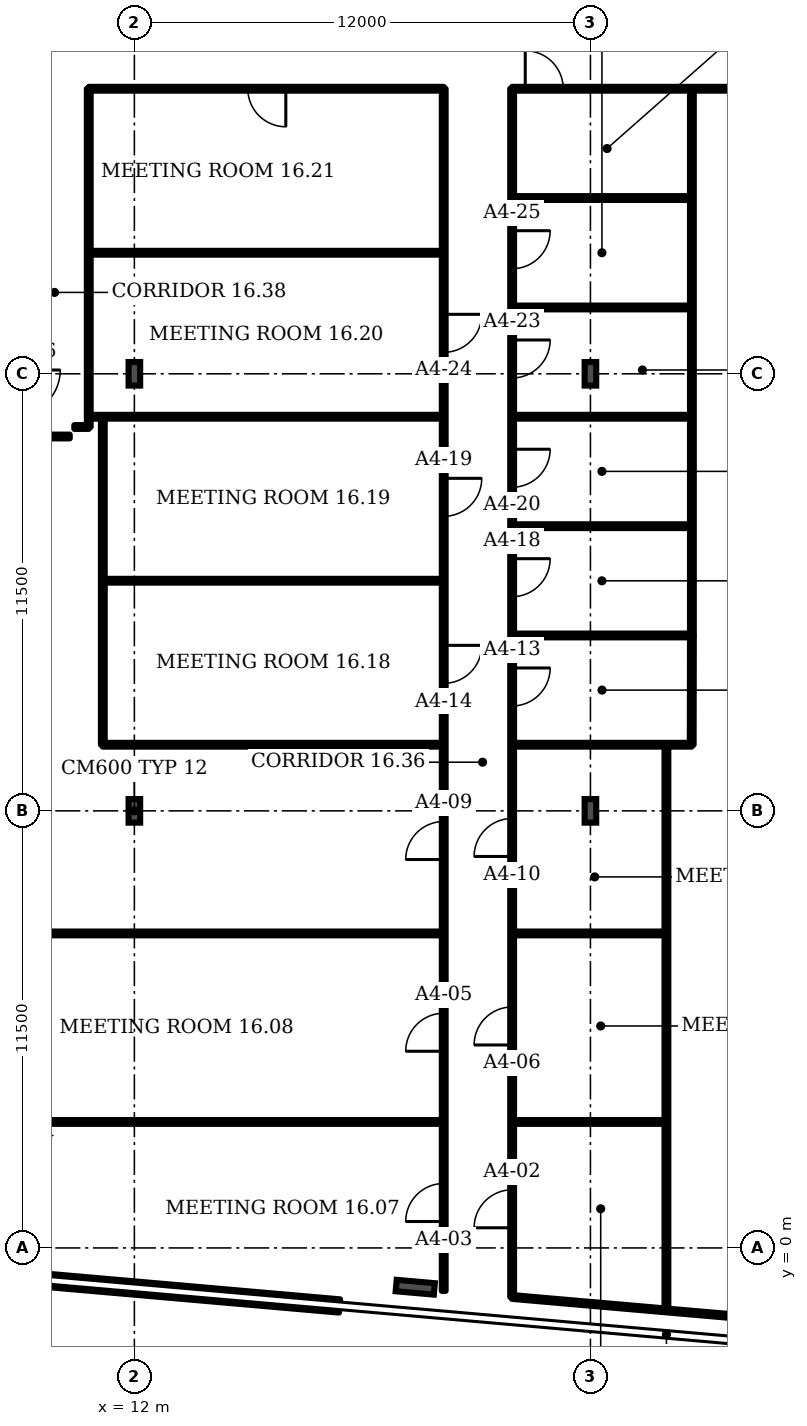
"""IFC4 building model, lengths in metres.
Left out: names, types, materials, properties, quantities, classifications, styles, units other than length and angle.
Written with IfcOpenShell. Run it as: python <this file> out.ifc"""

import sys

from ifc_helpers import new_model, si_unit, direction, frame, frame_2d, origin, origin_2d, place, context, subcontext, project, spatial, rectangle, i_section, extrude, element, fill, save


model = new_model("IFC4")
c1 = context("Model", 3, precision=1e-05, world=origin(), true_north=direction((0.0, 1.0)))
c2 = subcontext(c1, "Body", "Model", "MODEL_VIEW")
j1 = project(units=[si_unit("LENGTHUNIT", "METRE"), si_unit("PLANEANGLEUNIT", "RADIAN")], contexts=[c1])
p1 = place(None, origin())
s1 = spatial("IfcSite", under=j1, at=p1, CompositionType="ELEMENT")
p2 = place(p1, origin())
s2 = spatial("IfcBuilding", under=s1, at=p2, CompositionType="ELEMENT")
p3 = place(p2, frame((0.0, 0.0, 77.5)))
s3 = spatial("IfcBuildingStorey", under=s2, at=p3, CompositionType="ELEMENT", Elevation=77.5)
p4 = place(p3, frame((19.391, -1.034, 0.0), z_axis=(0.0, 0.0, 1.0), x_axis=(-0.087156, -0.996198, 0.0)))
e1 = element("IfcColumn", 1, at=p4, inside=s3, PredefinedType="COLUMN", context=c2, shape_type="SweptSolid", body=[
    extrude(i_section(OverallWidth=0.302, OverallDepth=1.008, WebThickness=0.021, FlangeThickness=0.04, FilletRadius=0.03, at=origin_2d()), origin(), (0.0, 0.0, 1.0), 3.6),
])
for number, where, z_axis, x_axis in (
    (2, (12.0, 11.5, 0.0), (0.0, 0.0, 1.0), (1.0, 0.0, 0.0)),
    (3, (24.0, 11.5, 0.0), (0.0, 0.0, 1.0), (1.0, 0.0, 0.0)),
    (4, (12.0, 23.0, 0.0), (0.0, 0.0, 1.0), (1.0, 0.0, 0.0)),
    (5, (24.0, 23.0, 0.0), (0.0, 0.0, 1.0), (1.0, 0.0, 0.0)),
):
    element("IfcColumn", number, at=place(p3, frame(where, z_axis=z_axis, x_axis=x_axis)), inside=s3, PredefinedType="COLUMN", context=c2, shape_type="SweptSolid", body=[
        extrude(i_section(OverallWidth=0.305, OverallDepth=0.62, WebThickness=0.021, FlangeThickness=0.04, FilletRadius=0.027, at=origin_2d()), origin(), (0.0, 0.0, 1.0), 3.6),
    ])
p5 = place(p3, frame((5.835, -0.516, 0.0), z_axis=(0.0, 0.0, 1.0), x_axis=(0.996192, -0.087142, 0.0)))
e6 = element("IfcWall", 6, at=p5, inside=s3, PredefinedType="SOLIDWALL", context=c2, shape_type="SweptSolid", body=[
    extrude(rectangle(XDim=11.607, YDim=0.35, at=frame_2d((5.804, 0.0))), origin(), (0.0, 0.0, 1.0), 1.0),
])
p6 = place(p3, frame((6.0, 8.275, 0.0), z_axis=(0.0, 0.0, 1.0), x_axis=(1.0, 0.0, 0.0)))
e7 = element("IfcWall", 7, at=p6, inside=s3, PredefinedType="PARTITIONING", context=c2, shape_type="SweptSolid", body=[
    extrude(rectangle(XDim=14.14, YDim=0.1, at=frame_2d((7.07, 0.0))), origin(), (0.0, 0.0, 1.0), 3.2),
])
p7 = place(p3, frame((6.02, 3.315, 0.0), z_axis=(0.0, 0.0, 1.0), x_axis=(1.0, 0.0, 0.0)))
e8 = element("IfcWall", 8, at=p7, inside=s3, PredefinedType="PARTITIONING", context=c2, shape_type="SweptSolid", body=[
    extrude(rectangle(XDim=14.12, YDim=0.1, at=frame_2d((7.06, 0.0))), origin(), (0.0, 0.0, 1.0), 3.2),
])
p8 = place(p3, frame((9.02, 21.35, 0.0), z_axis=(0.0, 0.0, 1.0), x_axis=(1.0, 0.0, 0.0)))
e9 = element("IfcWall", 9, at=p8, inside=s3, PredefinedType="PARTITIONING", context=c2, shape_type="SweptSolid", body=[
    extrude(rectangle(XDim=1.28, YDim=0.1, at=frame_2d((0.64, 0.0))), origin(), (0.0, 0.0, 1.0), 3.2),
])
p9 = place(p3, frame((10.42, 21.6, 0.0), z_axis=(0.0, 0.0, 1.0), x_axis=(1.0, 0.0, 0.0)))
e10 = element("IfcWall", 10, at=p9, inside=s3, PredefinedType="PARTITIONING", context=c2, shape_type="SweptSolid", body=[
    extrude(rectangle(XDim=0.38, YDim=0.1, at=frame_2d((0.19, 0.0))), origin(), (0.0, 0.0, 1.0), 3.2),
])
p10 = place(p3, frame((10.8, 21.6, 0.0), z_axis=(0.0, 0.0, 1.0), x_axis=(0.0, 1.0, 0.0)))
e11 = element("IfcWall", 11, at=p10, inside=s3, PredefinedType="PARTITIONING", context=c2, shape_type="SweptSolid", body=[
    extrude(rectangle(XDim=8.9, YDim=0.1, at=frame_2d((4.45, 0.0))), origin(), (0.0, 0.0, 1.0), 3.2),
])
for number, where, z_axis, x_axis in (
    (12, (10.8, 21.87, 0.0), (0.0, 0.0, 1.0), (1.0, 0.0, 0.0)),
    (13, (10.8, 26.185, 0.0), (0.0, 0.0, 1.0), (1.0, 0.0, 0.0)),
):
    element("IfcWall", number, at=place(p3, frame(where, z_axis=z_axis, x_axis=x_axis)), inside=s3, PredefinedType="PARTITIONING", context=c2, shape_type="SweptSolid", body=[
        extrude(rectangle(XDim=9.34, YDim=0.1, at=frame_2d((4.67, 0.0))), origin(), (0.0, 0.0, 1.0), 3.2),
    ])
p11 = place(p3, frame((10.8, 30.5, 0.0), z_axis=(0.0, 0.0, 1.0), x_axis=(1.0, 0.0, 0.0)))
e14 = element("IfcWall", 14, at=p11, inside=s3, PredefinedType="PARTITIONING", context=c2, shape_type="SweptSolid", body=[
    extrude(rectangle(XDim=9.34, YDim=0.1, at=frame_2d((4.67, 0.0))), origin(), (0.0, 0.0, 1.0), 3.2),
])
p12 = place(p11, frame((4.185, 0.0, 0.0)))
e15 = element("IfcOpeningElement", 15, at=p12, cuts=e14, PredefinedType="OPENING", context=c2, shape_type="SweptSolid", body=[
    extrude(rectangle(XDim=1.0, YDim=2.1, at=frame_2d((0.5, 1.05))), frame((0.0, 0.06, 0.0), z_axis=(0.0, -1.0, 0.0), x_axis=(1.0, 0.0, 0.0)), (0.0, 0.0, 1.0), 0.12),
])
p13 = place(p3, frame((11.17, 13.24, 0.0), z_axis=(0.0, 0.0, 1.0), x_axis=(0.0, 1.0, 0.0)))
e16 = element("IfcWall", 16, at=p13, inside=s3, PredefinedType="PARTITIONING", context=c2, shape_type="SweptSolid", body=[
    extrude(rectangle(XDim=8.63, YDim=0.1, at=frame_2d((4.315, 0.0))), origin(), (0.0, 0.0, 1.0), 3.2),
])
for number, where, z_axis, x_axis in (
    (17, (11.17, 13.24, 0.0), (0.0, 0.0, 1.0), (1.0, 0.0, 0.0)),
    (18, (11.17, 17.555, 0.0), (0.0, 0.0, 1.0), (1.0, 0.0, 0.0)),
):
    element("IfcWall", number, at=place(p3, frame(where, z_axis=z_axis, x_axis=x_axis)), inside=s3, PredefinedType="PARTITIONING", context=c2, shape_type="SweptSolid", body=[
        extrude(rectangle(XDim=8.97, YDim=0.1, at=frame_2d((4.485, 0.0))), origin(), (0.0, 0.0, 1.0), 3.2),
    ])
p14 = place(p3, frame((20.14, -1.13, 0.0), z_axis=(0.0, 0.0, 1.0), x_axis=(0.0, 1.0, 0.0)))
e19 = element("IfcWall", 19, at=p14, inside=s3, PredefinedType="PARTITIONING", context=c2, shape_type="SweptSolid", body=[
    extrude(rectangle(XDim=31.63, YDim=0.1, at=frame_2d((15.815, 0.0))), origin(), (0.0, 0.0, 1.0), 3.2),
])
p15 = place(p14, frame((1.825, 0.0, 0.0)))
e20 = element("IfcOpeningElement", 20, at=p15, cuts=e19, PredefinedType="OPENING", context=c2, shape_type="SweptSolid", body=[
    extrude(rectangle(XDim=1.0, YDim=2.1, at=frame_2d((0.5, 1.05))), frame((0.0, 0.06, 0.0), z_axis=(0.0, -1.0, 0.0), x_axis=(1.0, 0.0, 0.0)), (0.0, 0.0, 1.0), 0.12),
])
p16 = place(p14, frame((6.305, 0.0, 0.0)))
e21 = element("IfcOpeningElement", 21, at=p16, cuts=e19, PredefinedType="OPENING", context=c2, shape_type="SweptSolid", body=[
    extrude(rectangle(XDim=1.0, YDim=2.1, at=frame_2d((0.5, 1.05))), frame((0.0, 0.06, 0.0), z_axis=(0.0, -1.0, 0.0), x_axis=(1.0, 0.0, 0.0)), (0.0, 0.0, 1.0), 0.12),
])
p17 = place(p14, frame((11.35, 0.0, 0.0)))
e22 = element("IfcOpeningElement", 22, at=p17, cuts=e19, PredefinedType="OPENING", context=c2, shape_type="SweptSolid", body=[
    extrude(rectangle(XDim=1.0, YDim=2.1, at=frame_2d((0.5, 1.05))), frame((0.0, 0.06, 0.0), z_axis=(0.0, -1.0, 0.0), x_axis=(1.0, 0.0, 0.0)), (0.0, 0.0, 1.0), 0.12),
])
p18 = place(p14, frame((15.985, 0.0, 0.0)))
e23 = element("IfcOpeningElement", 23, at=p18, cuts=e19, PredefinedType="OPENING", context=c2, shape_type="SweptSolid", body=[
    extrude(rectangle(XDim=1.0, YDim=2.1, at=frame_2d((0.5, 1.05))), frame((0.0, 0.06, 0.0), z_axis=(0.0, -1.0, 0.0), x_axis=(1.0, 0.0, 0.0)), (0.0, 0.0, 1.0), 0.12),
])
p19 = place(p14, frame((20.38, 0.0, 0.0)))
e24 = element("IfcOpeningElement", 24, at=p19, cuts=e19, PredefinedType="OPENING", context=c2, shape_type="SweptSolid", body=[
    extrude(rectangle(XDim=1.0, YDim=2.1, at=frame_2d((0.5, 1.05))), frame((0.0, 0.06, 0.0), z_axis=(0.0, -1.0, 0.0), x_axis=(1.0, 0.0, 0.0)), (0.0, 0.0, 1.0), 0.12),
])
p20 = place(p14, frame((24.695, 0.0, 0.0)))
e25 = element("IfcOpeningElement", 25, at=p20, cuts=e19, PredefinedType="OPENING", context=c2, shape_type="SweptSolid", body=[
    extrude(rectangle(XDim=1.0, YDim=2.1, at=frame_2d((0.5, 1.05))), frame((0.0, 0.06, 0.0), z_axis=(0.0, -1.0, 0.0), x_axis=(1.0, 0.0, 0.0)), (0.0, 0.0, 1.0), 0.12),
])
p21 = place(p3, frame((21.94, -1.29, 0.0), z_axis=(0.0, 0.0, 1.0), x_axis=(0.0, 1.0, 0.0)))
e26 = element("IfcWall", 26, at=p21, inside=s3, PredefinedType="PARTITIONING", context=c2, shape_type="SweptSolid", body=[
    extrude(rectangle(XDim=31.79, YDim=0.1, at=frame_2d((15.895, 0.0))), origin(), (0.0, 0.0, 1.0), 3.2),
])
p22 = place(p21, frame((1.82, 0.0, 0.0)))
e27 = element("IfcOpeningElement", 27, at=p22, cuts=e26, PredefinedType="OPENING", context=c2, shape_type="SweptSolid", body=[
    extrude(rectangle(XDim=1.0, YDim=2.1, at=frame_2d((0.5, 1.05))), frame((0.0, 0.06, 0.0), z_axis=(0.0, -1.0, 0.0), x_axis=(1.0, 0.0, 0.0)), (0.0, 0.0, 1.0), 0.12),
])
p23 = place(p21, frame((6.63, 0.0, 0.0)))
e28 = element("IfcOpeningElement", 28, at=p23, cuts=e26, PredefinedType="OPENING", context=c2, shape_type="SweptSolid", body=[
    extrude(rectangle(XDim=1.0, YDim=2.1, at=frame_2d((0.5, 1.05))), frame((0.0, 0.06, 0.0), z_axis=(0.0, -1.0, 0.0), x_axis=(1.0, 0.0, 0.0)), (0.0, 0.0, 1.0), 0.12),
])
p24 = place(p21, frame((11.59, 0.0, 0.0)))
e29 = element("IfcOpeningElement", 29, at=p24, cuts=e26, PredefinedType="OPENING", context=c2, shape_type="SweptSolid", body=[
    extrude(rectangle(XDim=1.0, YDim=2.1, at=frame_2d((0.5, 1.05))), frame((0.0, 0.06, 0.0), z_axis=(0.0, -1.0, 0.0), x_axis=(1.0, 0.0, 0.0)), (0.0, 0.0, 1.0), 0.12),
])
p25 = place(p21, frame((15.55, 0.0, 0.0)))
e30 = element("IfcOpeningElement", 30, at=p25, cuts=e26, PredefinedType="OPENING", context=c2, shape_type="SweptSolid", body=[
    extrude(rectangle(XDim=1.0, YDim=2.1, at=frame_2d((0.5, 1.05))), frame((0.0, 0.06, 0.0), z_axis=(0.0, -1.0, 0.0), x_axis=(1.0, 0.0, 0.0)), (0.0, 0.0, 1.0), 0.12),
])
p26 = place(p21, frame((18.425, 0.0, 0.0)))
e31 = element("IfcOpeningElement", 31, at=p26, cuts=e26, PredefinedType="OPENING", context=c2, shape_type="SweptSolid", body=[
    extrude(rectangle(XDim=1.0, YDim=2.1, at=frame_2d((0.5, 1.05))), frame((0.0, 0.06, 0.0), z_axis=(0.0, -1.0, 0.0), x_axis=(1.0, 0.0, 0.0)), (0.0, 0.0, 1.0), 0.12),
])
p27 = place(p21, frame((21.305, 0.0, 0.0)))
e32 = element("IfcOpeningElement", 32, at=p27, cuts=e26, PredefinedType="OPENING", context=c2, shape_type="SweptSolid", body=[
    extrude(rectangle(XDim=1.0, YDim=2.1, at=frame_2d((0.5, 1.05))), frame((0.0, 0.06, 0.0), z_axis=(0.0, -1.0, 0.0), x_axis=(1.0, 0.0, 0.0)), (0.0, 0.0, 1.0), 0.12),
])
p28 = place(p21, frame((24.18, 0.0, 0.0)))
e33 = element("IfcOpeningElement", 33, at=p28, cuts=e26, PredefinedType="OPENING", context=c2, shape_type="SweptSolid", body=[
    extrude(rectangle(XDim=1.0, YDim=2.1, at=frame_2d((0.5, 1.05))), frame((0.0, 0.06, 0.0), z_axis=(0.0, -1.0, 0.0), x_axis=(1.0, 0.0, 0.0)), (0.0, 0.0, 1.0), 0.12),
])
p29 = place(p21, frame((27.055, 0.0, 0.0)))
e34 = element("IfcOpeningElement", 34, at=p29, cuts=e26, PredefinedType="OPENING", context=c2, shape_type="SweptSolid", body=[
    extrude(rectangle(XDim=1.0, YDim=2.1, at=frame_2d((0.5, 1.05))), frame((0.0, 0.06, 0.0), z_axis=(0.0, -1.0, 0.0), x_axis=(1.0, 0.0, 0.0)), (0.0, 0.0, 1.0), 0.12),
])
for number, where, z_axis, x_axis in (
    (35, (21.94, 3.315, 0.0), (0.0, 0.0, 1.0), (1.0, 0.0, 0.0)),
    (36, (21.94, 8.275, 0.0), (0.0, 0.0, 1.0), (1.0, 0.0, 0.0)),
):
    element("IfcWall", number, at=place(p3, frame(where, z_axis=z_axis, x_axis=x_axis)), inside=s3, PredefinedType="PARTITIONING", context=c2, shape_type="SweptSolid", body=[
        extrude(rectangle(XDim=4.06, YDim=0.1, at=frame_2d((2.03, 0.0))), origin(), (0.0, 0.0, 1.0), 3.2),
    ])
for number, where, z_axis, x_axis in (
    (37, (21.94, 13.24, 0.0), (0.0, 0.0, 1.0), (1.0, 0.0, 0.0)),
    (38, (21.94, 16.115, 0.0), (0.0, 0.0, 1.0), (1.0, 0.0, 0.0)),
    (39, (21.94, 18.99, 0.0), (0.0, 0.0, 1.0), (1.0, 0.0, 0.0)),
    (40, (21.94, 21.87, 0.0), (0.0, 0.0, 1.0), (1.0, 0.0, 0.0)),
    (41, (21.94, 24.745, 0.0), (0.0, 0.0, 1.0), (1.0, 0.0, 0.0)),
    (42, (21.94, 27.625, 0.0), (0.0, 0.0, 1.0), (1.0, 0.0, 0.0)),
):
    element("IfcWall", number, at=place(p3, frame(where, z_axis=z_axis, x_axis=x_axis)), inside=s3, PredefinedType="PARTITIONING", context=c2, shape_type="SweptSolid", body=[
        extrude(rectangle(XDim=4.725, YDim=0.1, at=frame_2d((2.363, 0.0))), origin(), (0.0, 0.0, 1.0), 3.2),
    ])
p30 = place(p3, frame((21.94, 30.5, 0.0), z_axis=(0.0, 0.0, 1.0), x_axis=(1.0, 0.0, 0.0)))
e43 = element("IfcWall", 43, at=p30, inside=s3, PredefinedType="PARTITIONING", context=c2, shape_type="SweptSolid", body=[
    extrude(rectangle(XDim=14.91, YDim=0.1, at=frame_2d((7.455, 0.0))), origin(), (0.0, 0.0, 1.0), 3.2),
])
p31 = place(p30, frame((0.345, 0.0, 0.0)))
e44 = element("IfcOpeningElement", 44, at=p31, cuts=e43, PredefinedType="OPENING", context=c2, shape_type="SweptSolid", body=[
    extrude(rectangle(XDim=1.0, YDim=2.1, at=frame_2d((0.5, 1.05))), frame((0.0, 0.06, 0.0), z_axis=(0.0, -1.0, 0.0), x_axis=(1.0, 0.0, 0.0)), (0.0, 0.0, 1.0), 0.12),
])
p32 = place(p30, frame((8.95, 0.0, 0.0)))
e45 = element("IfcOpeningElement", 45, at=p32, cuts=e43, PredefinedType="OPENING", context=c2, shape_type="SweptSolid", body=[
    extrude(rectangle(XDim=1.8, YDim=2.1, at=frame_2d((0.9, 1.05))), frame((0.0, 0.06, 0.0), z_axis=(0.0, -1.0, 0.0), x_axis=(1.0, 0.0, 0.0)), (0.0, 0.0, 1.0), 0.12),
])
p33 = place(p3, frame((26.0, -1.645, 0.0), z_axis=(0.0, 0.0, 1.0), x_axis=(0.0, 1.0, 0.0)))
e46 = element("IfcWall", 46, at=p33, inside=s3, PredefinedType="PARTITIONING", context=c2, shape_type="SweptSolid", body=[
    extrude(rectangle(XDim=14.885, YDim=0.1, at=frame_2d((7.442, 0.0))), origin(), (0.0, 0.0, 1.0), 3.2),
])
p34 = place(p3, frame((26.665, 13.24, 0.0), z_axis=(0.0, 0.0, 1.0), x_axis=(0.001698, 0.999995, 0.0)))
e47 = element("IfcWall", 47, at=p34, inside=s3, PredefinedType="PARTITIONING", context=c2, shape_type="SweptSolid", body=[
    extrude(rectangle(XDim=2.875, YDim=0.1, at=frame_2d((1.438, 0.0))), origin(), (0.0, 0.0, 1.0), 3.2),
])
p35 = place(p3, frame((26.67, 16.115, 0.0), z_axis=(0.0, 0.0, 1.0), x_axis=(0.0, 1.0, 0.0)))
e48 = element("IfcWall", 48, at=p35, inside=s3, PredefinedType="PARTITIONING", context=c2, shape_type="SweptSolid", body=[
    extrude(rectangle(XDim=14.385, YDim=0.1, at=frame_2d((7.192, 0.0))), origin(), (0.0, 0.0, 1.0), 3.2),
])
p36 = place(p3, frame((33.22, -2.275, 0.0), z_axis=(0.0, 0.0, 1.0), x_axis=(-0.996212, 0.086913, 0.0)))
e49 = element("IfcWall", 49, at=p36, inside=s3, PredefinedType="PARTITIONING", context=c2, shape_type="SweptSolid", body=[
    extrude(rectangle(XDim=11.323, YDim=0.1, at=frame_2d((5.662, 0.0))), origin(), (0.0, 0.0, 1.0), 2.58),
])
p37 = place(p22, origin())
e50 = element("IfcDoor", 50, at=p37, inside=s3, OperationType="SINGLE_SWING_LEFT", PredefinedType="DOOR", context=c2, shape_type="SweptSolid", body=[
    extrude(rectangle(XDim=1.0, YDim=2.1, at=frame_2d((0.5, 1.05))), frame((0.0, 0.025, 0.0), z_axis=(0.0, -1.0, 0.0), x_axis=(1.0, 0.0, 0.0)), (0.0, 0.0, 1.0), 0.05),
])
fill(e27, e50)
p38 = place(p15, origin())
e51 = element("IfcDoor", 51, at=p38, inside=s3, OperationType="SINGLE_SWING_LEFT", PredefinedType="DOOR", context=c2, shape_type="SweptSolid", body=[
    extrude(rectangle(XDim=1.0, YDim=2.1, at=frame_2d((0.5, 1.05))), frame((0.0, 0.025, 0.0), z_axis=(0.0, -1.0, 0.0), x_axis=(1.0, 0.0, 0.0)), (0.0, 0.0, 1.0), 0.05),
])
fill(e20, e51)
p39 = place(p16, origin())
e52 = element("IfcDoor", 52, at=p39, inside=s3, OperationType="SINGLE_SWING_LEFT", PredefinedType="DOOR", context=c2, shape_type="SweptSolid", body=[
    extrude(rectangle(XDim=1.0, YDim=2.1, at=frame_2d((0.5, 1.05))), frame((0.0, 0.025, 0.0), z_axis=(0.0, -1.0, 0.0), x_axis=(1.0, 0.0, 0.0)), (0.0, 0.0, 1.0), 0.05),
])
fill(e21, e52)
p40 = place(p23, origin())
e53 = element("IfcDoor", 53, at=p40, inside=s3, OperationType="SINGLE_SWING_LEFT", PredefinedType="DOOR", context=c2, shape_type="SweptSolid", body=[
    extrude(rectangle(XDim=1.0, YDim=2.1, at=frame_2d((0.5, 1.05))), frame((0.0, 0.025, 0.0), z_axis=(0.0, -1.0, 0.0), x_axis=(1.0, 0.0, 0.0)), (0.0, 0.0, 1.0), 0.05),
])
fill(e28, e53)
p41 = place(p17, origin())
e54 = element("IfcDoor", 54, at=p41, inside=s3, OperationType="SINGLE_SWING_LEFT", PredefinedType="DOOR", context=c2, shape_type="SweptSolid", body=[
    extrude(rectangle(XDim=1.0, YDim=2.1, at=frame_2d((0.5, 1.05))), frame((0.0, 0.025, 0.0), z_axis=(0.0, -1.0, 0.0), x_axis=(1.0, 0.0, 0.0)), (0.0, 0.0, 1.0), 0.05),
])
fill(e22, e54)
p42 = place(p24, origin())
e55 = element("IfcDoor", 55, at=p42, inside=s3, OperationType="SINGLE_SWING_LEFT", PredefinedType="DOOR", context=c2, shape_type="SweptSolid", body=[
    extrude(rectangle(XDim=1.0, YDim=2.1, at=frame_2d((0.5, 1.05))), frame((0.0, 0.025, 0.0), z_axis=(0.0, -1.0, 0.0), x_axis=(1.0, 0.0, 0.0)), (0.0, 0.0, 1.0), 0.05),
])
fill(e29, e55)
p43 = place(p25, origin())
e56 = element("IfcDoor", 56, at=p43, inside=s3, OperationType="SINGLE_SWING_RIGHT", PredefinedType="DOOR", context=c2, shape_type="SweptSolid", body=[
    extrude(rectangle(XDim=1.0, YDim=2.1, at=frame_2d((0.5, 1.05))), frame((0.0, 0.025, 0.0), z_axis=(0.0, -1.0, 0.0), x_axis=(1.0, 0.0, 0.0)), (0.0, 0.0, 1.0), 0.05),
])
fill(e30, e56)
p44 = place(p18, origin())
e57 = element("IfcDoor", 57, at=p44, inside=s3, OperationType="SINGLE_SWING_RIGHT", PredefinedType="DOOR", context=c2, shape_type="SweptSolid", body=[
    extrude(rectangle(XDim=1.0, YDim=2.1, at=frame_2d((0.5, 1.05))), frame((0.0, 0.025, 0.0), z_axis=(0.0, -1.0, 0.0), x_axis=(1.0, 0.0, 0.0)), (0.0, 0.0, 1.0), 0.05),
])
fill(e23, e57)
p45 = place(p26, origin())
e58 = element("IfcDoor", 58, at=p45, inside=s3, OperationType="SINGLE_SWING_RIGHT", PredefinedType="DOOR", context=c2, shape_type="SweptSolid", body=[
    extrude(rectangle(XDim=1.0, YDim=2.1, at=frame_2d((0.5, 1.05))), frame((0.0, 0.025, 0.0), z_axis=(0.0, -1.0, 0.0), x_axis=(1.0, 0.0, 0.0)), (0.0, 0.0, 1.0), 0.05),
])
fill(e31, e58)
p46 = place(p19, origin())
e59 = element("IfcDoor", 59, at=p46, inside=s3, OperationType="SINGLE_SWING_RIGHT", PredefinedType="DOOR", context=c2, shape_type="SweptSolid", body=[
    extrude(rectangle(XDim=1.0, YDim=2.1, at=frame_2d((0.5, 1.05))), frame((0.0, 0.025, 0.0), z_axis=(0.0, -1.0, 0.0), x_axis=(1.0, 0.0, 0.0)), (0.0, 0.0, 1.0), 0.05),
])
fill(e24, e59)
p47 = place(p27, origin())
e60 = element("IfcDoor", 60, at=p47, inside=s3, OperationType="SINGLE_SWING_RIGHT", PredefinedType="DOOR", context=c2, shape_type="SweptSolid", body=[
    extrude(rectangle(XDim=1.0, YDim=2.1, at=frame_2d((0.5, 1.05))), frame((0.0, 0.025, 0.0), z_axis=(0.0, -1.0, 0.0), x_axis=(1.0, 0.0, 0.0)), (0.0, 0.0, 1.0), 0.05),
])
fill(e32, e60)
p48 = place(p28, origin())
e61 = element("IfcDoor", 61, at=p48, inside=s3, OperationType="SINGLE_SWING_RIGHT", PredefinedType="DOOR", context=c2, shape_type="SweptSolid", body=[
    extrude(rectangle(XDim=1.0, YDim=2.1, at=frame_2d((0.5, 1.05))), frame((0.0, 0.025, 0.0), z_axis=(0.0, -1.0, 0.0), x_axis=(1.0, 0.0, 0.0)), (0.0, 0.0, 1.0), 0.05),
])
fill(e33, e61)
p49 = place(p20, origin())
e62 = element("IfcDoor", 62, at=p49, inside=s3, OperationType="SINGLE_SWING_RIGHT", PredefinedType="DOOR", context=c2, shape_type="SweptSolid", body=[
    extrude(rectangle(XDim=1.0, YDim=2.1, at=frame_2d((0.5, 1.05))), frame((0.0, 0.025, 0.0), z_axis=(0.0, -1.0, 0.0), x_axis=(1.0, 0.0, 0.0)), (0.0, 0.0, 1.0), 0.05),
])
fill(e25, e62)
p50 = place(p29, origin())
e63 = element("IfcDoor", 63, at=p50, inside=s3, OperationType="SINGLE_SWING_RIGHT", PredefinedType="DOOR", context=c2, shape_type="SweptSolid", body=[
    extrude(rectangle(XDim=1.0, YDim=2.1, at=frame_2d((0.5, 1.05))), frame((0.0, 0.025, 0.0), z_axis=(0.0, -1.0, 0.0), x_axis=(1.0, 0.0, 0.0)), (0.0, 0.0, 1.0), 0.05),
])
fill(e34, e63)
p51 = place(p12, origin())
e64 = element("IfcDoor", 64, at=p51, inside=s3, OperationType="SINGLE_SWING_RIGHT", PredefinedType="DOOR", context=c2, shape_type="SweptSolid", body=[
    extrude(rectangle(XDim=1.0, YDim=2.1, at=frame_2d((0.5, 1.05))), frame((0.0, 0.025, 0.0), z_axis=(0.0, -1.0, 0.0), x_axis=(1.0, 0.0, 0.0)), (0.0, 0.0, 1.0), 0.05),
])
fill(e15, e64)
p52 = place(p31, origin())
e65 = element("IfcDoor", 65, at=p52, inside=s3, OperationType="SINGLE_SWING_LEFT", PredefinedType="DOOR", context=c2, shape_type="SweptSolid", body=[
    extrude(rectangle(XDim=1.0, YDim=2.1, at=frame_2d((0.5, 1.05))), frame((0.0, 0.025, 0.0), z_axis=(0.0, -1.0, 0.0), x_axis=(1.0, 0.0, 0.0)), (0.0, 0.0, 1.0), 0.05),
])
fill(e44, e65)
save(model, sys.argv[1])
